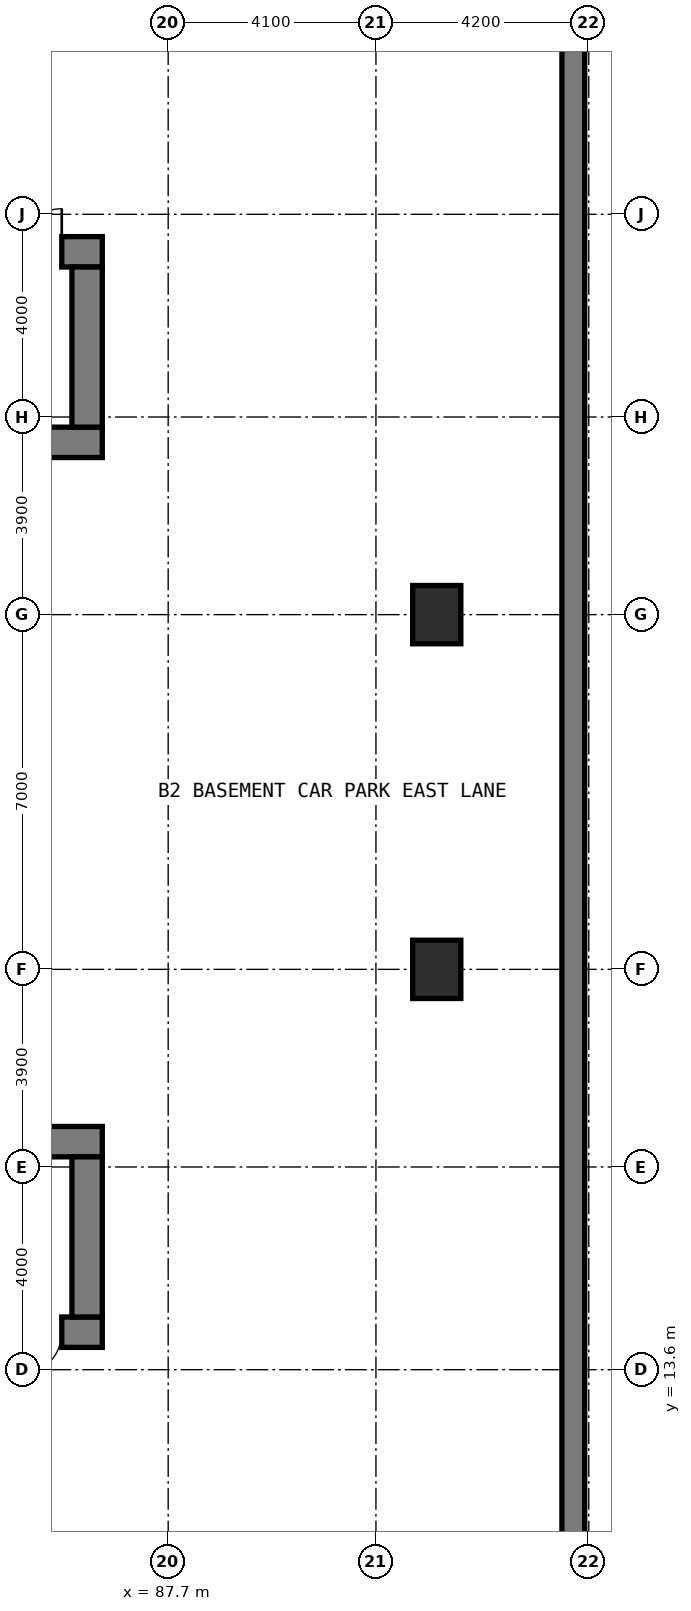
"""IFC4 building model, lengths in metres.
Left out: names, types, materials, properties, quantities, classifications, styles, units other than length and angle.
Written with IfcOpenShell. Run it as: python <this file> out.ifc"""

import sys

from ifc_helpers import new_model, si_unit, direction, frame, frame_2d, origin, origin_2d, place, context, subcontext, project, spatial, rectangle, extrude, element, fill, save


model = new_model("IFC4")
c1 = context("Model", 3, precision=1e-05, world=origin(), true_north=direction((0.0, 1.0)))
c2 = subcontext(c1, "Body", "Model", "MODEL_VIEW")
j1 = project(units=[si_unit("LENGTHUNIT", "METRE"), si_unit("PLANEANGLEUNIT", "RADIAN")], contexts=[c1])
p1 = place(None, origin())
s1 = spatial("IfcSite", under=j1, at=p1, CompositionType="ELEMENT")
p2 = place(p1, origin())
s2 = spatial("IfcBuilding", under=s1, at=p2, CompositionType="ELEMENT")
p3 = place(p2, frame((0.0, 0.0, -8.4)))
s3 = spatial("IfcBuildingStorey", under=s2, at=p3, CompositionType="ELEMENT", Elevation=-8.4)
p4 = place(p3, frame((95.695, 0.53, 0.0), z_axis=(0.0, 0.0, 1.0), x_axis=(0.0, 1.0, 0.0)))
e1 = element("IfcWall", 1, at=p4, inside=s3, PredefinedType="USERDEFINED", context=c2, shape_type="SweptSolid", body=[
    extrude(rectangle(XDim=48.94, YDim=0.45, at=frame_2d((24.47, 0.0))), origin(), (0.0, 0.0, 1.0), 4.2),
])
p5 = place(p3, frame((67.8, 31.9, 0.0), z_axis=(0.0, 0.0, 1.0), x_axis=(1.0, 0.0, 0.0)))
e2 = element("IfcWall", 2, at=p5, inside=s3, PredefinedType="SHEAR", context=c2, shape_type="SweptSolid", body=[
    extrude(rectangle(XDim=18.6, YDim=0.6, at=frame_2d((9.3, 0.0))), origin(), (0.0, 0.0, 1.0), 4.2),
])
p6 = place(p3, frame((67.8, 35.66, 0.0), z_axis=(0.0, 0.0, 1.0), x_axis=(1.0, 0.0, 0.0)))
e3 = element("IfcWall", 3, at=p6, inside=s3, PredefinedType="SHEAR", context=c2, shape_type="SweptSolid", body=[
    extrude(rectangle(XDim=18.6, YDim=0.6, at=frame_2d((9.3, 0.0))), origin(), (0.0, 0.0, 1.0), 4.2),
])
p7 = place(p6, frame((9.35, 0.0, 0.0)))
e4 = element("IfcOpeningElement", 4, at=p7, cuts=e3, PredefinedType="OPENING", context=c2, shape_type="SweptSolid", body=[
    extrude(rectangle(XDim=1.2, YDim=2.15, at=frame_2d((0.6, 1.075))), frame((0.0, 0.31, 0.0), z_axis=(0.0, -1.0, 0.0), x_axis=(1.0, 0.0, 0.0)), (0.0, 0.0, 1.0), 0.62),
])
p8 = place(p6, frame((16.95, 0.0, 0.0)))
e5 = element("IfcOpeningElement", 5, at=p8, cuts=e3, PredefinedType="OPENING", context=c2, shape_type="SweptSolid", body=[
    extrude(rectangle(XDim=0.85, YDim=2.1, at=frame_2d((0.425, 1.05))), frame((0.0, 0.31, 0.0), z_axis=(0.0, -1.0, 0.0), x_axis=(1.0, 0.0, 0.0)), (0.0, 0.0, 1.0), 0.62),
])
p9 = place(p3, frame((86.1, 32.2, 0.0), z_axis=(0.0, 0.0, 1.0), x_axis=(0.0, 1.0, 0.0)))
e6 = element("IfcWall", 6, at=p9, inside=s3, PredefinedType="SHEAR", context=c2, shape_type="SweptSolid", body=[
    extrude(rectangle(XDim=3.16, YDim=0.6, at=frame_2d((1.58, 0.0))), origin(), (0.0, 0.0, 1.0), 4.2),
])
p10 = place(p3, frame((67.8, 14.34, 0.0), z_axis=(0.0, 0.0, 1.0), x_axis=(1.0, 0.0, 0.0)))
e7 = element("IfcWall", 7, at=p10, inside=s3, PredefinedType="SHEAR", context=c2, shape_type="SweptSolid", body=[
    extrude(rectangle(XDim=18.6, YDim=0.6, at=frame_2d((9.3, 0.0))), origin(), (0.0, 0.0, 1.0), 4.2),
])
p11 = place(p10, frame((9.35, 0.0, 0.0)))
e8 = element("IfcOpeningElement", 8, at=p11, cuts=e7, PredefinedType="OPENING", context=c2, shape_type="SweptSolid", body=[
    extrude(rectangle(XDim=1.2, YDim=2.15, at=frame_2d((0.6, 1.075))), frame((0.0, 0.31, 0.0), z_axis=(0.0, -1.0, 0.0), x_axis=(1.0, 0.0, 0.0)), (0.0, 0.0, 1.0), 0.62),
])
p12 = place(p10, frame((16.95, 0.0, 0.0)))
e9 = element("IfcOpeningElement", 9, at=p12, cuts=e7, PredefinedType="OPENING", context=c2, shape_type="SweptSolid", body=[
    extrude(rectangle(XDim=0.85, YDim=2.1, at=frame_2d((0.425, 1.05))), frame((0.0, 0.31, 0.0), z_axis=(0.0, -1.0, 0.0), x_axis=(1.0, 0.0, 0.0)), (0.0, 0.0, 1.0), 0.62),
])
p13 = place(p10, frame((12.55, 0.0, 0.0)))
e10 = element("IfcOpeningElement", 10, at=p13, cuts=e7, PredefinedType="OPENING", context=c2, shape_type="SweptSolid", body=[
    extrude(rectangle(XDim=1.1, YDim=2.15, at=frame_2d((0.55, 1.075))), frame((0.0, 0.31, 0.0), z_axis=(0.0, -1.0, 0.0), x_axis=(1.0, 0.0, 0.0)), (0.0, 0.0, 1.0), 0.62),
])
p14 = place(p10, frame((14.15, 0.0, 0.0)))
e11 = element("IfcOpeningElement", 11, at=p14, cuts=e7, PredefinedType="OPENING", context=c2, shape_type="SweptSolid", body=[
    extrude(rectangle(XDim=1.1, YDim=2.15, at=frame_2d((0.55, 1.075))), frame((0.0, 0.31, 0.0), z_axis=(0.0, -1.0, 0.0), x_axis=(1.0, 0.0, 0.0)), (0.0, 0.0, 1.0), 0.62),
])
p15 = place(p3, frame((67.8, 18.1, 0.0), z_axis=(0.0, 0.0, 1.0), x_axis=(1.0, 0.0, 0.0)))
e12 = element("IfcWall", 12, at=p15, inside=s3, PredefinedType="SHEAR", context=c2, shape_type="SweptSolid", body=[
    extrude(rectangle(XDim=18.6, YDim=0.6, at=frame_2d((9.3, 0.0))), origin(), (0.0, 0.0, 1.0), 4.2),
])
p16 = place(p3, frame((86.1, 14.64, 0.0), z_axis=(0.0, 0.0, 1.0), x_axis=(0.0, 1.0, 0.0)))
e13 = element("IfcWall", 13, at=p16, inside=s3, PredefinedType="SHEAR", context=c2, shape_type="SweptSolid", body=[
    extrude(rectangle(XDim=3.16, YDim=0.6, at=frame_2d((1.58, 0.0))), origin(), (0.0, 0.0, 1.0), 4.2),
])
for number, where, z_axis, x_axis in (
    (14, (93.0, 21.5, 0.0), (0.0, 0.0, 1.0), (1.0, 0.0, 0.0)),
    (15, (93.0, 28.5, 0.0), (0.0, 0.0, 1.0), (1.0, 0.0, 0.0)),
):
    element("IfcColumn", number, at=place(p3, frame(where, z_axis=z_axis, x_axis=x_axis)), inside=s3, PredefinedType="COLUMN", context=c2, shape_type="SweptSolid", body=[
        extrude(rectangle(XDim=0.95, YDim=1.15, at=origin_2d()), origin(), (0.0, 0.0, 1.0), 4.2),
    ])
p17 = place(p8, origin())
e16 = element("IfcDoor", 16, at=p17, inside=s3, OperationType="SINGLE_SWING_RIGHT", PredefinedType="DOOR", context=c2, shape_type="SweptSolid", body=[
    extrude(rectangle(XDim=0.85, YDim=2.1, at=frame_2d((0.425, 1.05))), frame((0.0, 0.025, 0.0), z_axis=(0.0, -1.0, 0.0), x_axis=(1.0, 0.0, 0.0)), (0.0, 0.0, 1.0), 0.05),
])
fill(e5, e16)
p18 = place(p12, frame((0.85, 0.0, 0.0), z_axis=(0.0, 0.0, 1.0), x_axis=(-1.0, 0.0, 0.0)))
e17 = element("IfcDoor", 17, at=p18, inside=s3, OperationType="SINGLE_SWING_RIGHT", PredefinedType="DOOR", context=c2, shape_type="SweptSolid", body=[
    extrude(rectangle(XDim=0.85, YDim=2.1, at=frame_2d((0.425, 1.05))), frame((0.0, 0.025, 0.0), z_axis=(0.0, -1.0, 0.0), x_axis=(1.0, 0.0, 0.0)), (0.0, 0.0, 1.0), 0.05),
])
fill(e9, e17)
save(model, sys.argv[1])
